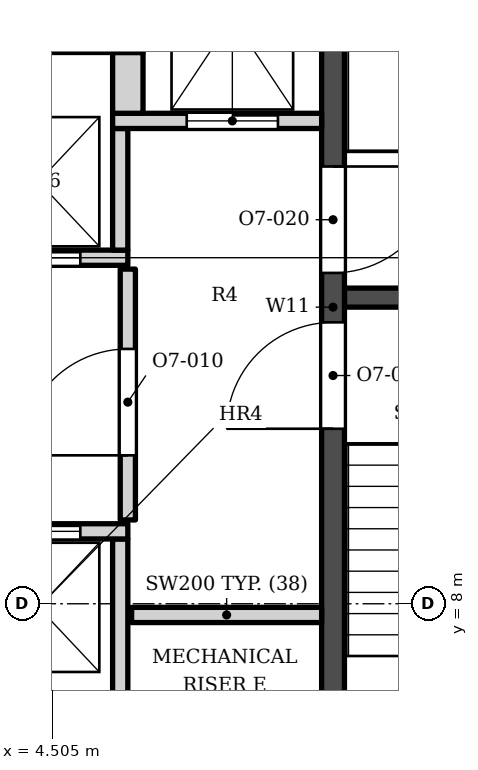
"""IFC4 building model, lengths in metres.
Left out: names, types, materials, properties, quantities, classifications, styles, units other than length and angle.
Written with IfcOpenShell. Run it as: python <this file> out.ifc"""

import sys

from ifc_helpers import new_model, si_unit, direction, frame, frame_2d, origin, place, context, subcontext, project, spatial, rectangle, extrude, element, fill, save


model = new_model("IFC4")
c1 = context("Model", 3, precision=1e-05, world=origin(), true_north=direction((0.0, 1.0)))
c2 = subcontext(c1, "Body", "Model", "MODEL_VIEW")
j1 = project(units=[si_unit("LENGTHUNIT", "METRE"), si_unit("PLANEANGLEUNIT", "RADIAN")], contexts=[c1])
p1 = place(None, origin())
s1 = spatial("IfcSite", under=j1, at=p1, CompositionType="ELEMENT")
p2 = place(p1, origin())
s2 = spatial("IfcBuilding", under=s1, at=p2, CompositionType="ELEMENT")
p3 = place(p2, frame((0.0, 0.0, 219.8)))
s3 = spatial("IfcBuildingStorey", under=s2, at=p3, CompositionType="ELEMENT", Elevation=219.8)
p4 = place(p3, frame((8.2, 5.253, 0.0), z_axis=(0.0, 0.0, 1.0), x_axis=(0.0, 1.0, 0.0)))
e1 = element("IfcWall", 1, at=p4, inside=s3, PredefinedType="SHEAR", context=c2, shape_type="SweptSolid", body=[
    extrude(rectangle(XDim=13.3, YDim=0.3, at=frame_2d((6.65, 0.0))), origin(), (0.0, 0.0, 1.0), 3.9),
])
p5 = place(p4, frame((7.1, 0.0, 0.0)))
e2 = element("IfcOpeningElement", 2, at=p5, cuts=e1, PredefinedType="OPENING", context=c2, shape_type="SweptSolid", body=[
    extrude(rectangle(XDim=1.4, YDim=2.1, at=frame_2d((0.7, 1.05))), frame((0.0, 0.16, 0.0), z_axis=(0.0, -1.0, 0.0), x_axis=(1.0, 0.0, 0.0)), (0.0, 0.0, 1.0), 0.32),
])
p6 = place(p4, frame((5.05, 0.0, 0.0)))
e3 = element("IfcOpeningElement", 3, at=p6, cuts=e1, PredefinedType="OPENING", context=c2, shape_type="SweptSolid", body=[
    extrude(rectangle(XDim=1.4, YDim=2.1, at=frame_2d((0.7, 1.05))), frame((0.0, 0.16, 0.0), z_axis=(0.0, -1.0, 0.0), x_axis=(1.0, 0.0, 0.0)), (0.0, 0.0, 1.0), 0.32),
])
p7 = place(p3, frame((8.35, 12.028, 0.0), z_axis=(0.0, 0.0, 1.0), x_axis=(1.0, 0.0, 0.0)))
e4 = element("IfcWall", 4, at=p7, inside=s3, PredefinedType="SHEAR", context=c2, shape_type="SweptSolid", body=[
    extrude(rectangle(XDim=3.75, YDim=0.25, at=frame_2d((1.875, 0.0))), origin(), (0.0, 0.0, 1.0), 3.9),
])
for number, where, z_axis, x_axis in (
    (5, (5.4, 6.353, 0.0), (0.0, 0.0, 1.0), (0.0, 1.0, 0.0)),
    (6, (5.55, 7.853, 0.0), (0.0, 0.0, 1.0), (1.0, 0.0, 0.0)),
):
    element("IfcWall", number, at=place(p3, frame(where, z_axis=z_axis, x_axis=x_axis)), inside=s3, PredefinedType="SOLIDWALL", context=c2, shape_type="SweptSolid", body=[
        extrude(rectangle(XDim=2.5, YDim=0.2, at=frame_2d((1.25, 0.0))), origin(), (0.0, 0.0, 1.0), 3.73),
    ])
p8 = place(p3, frame((1.0, 8.953, 0.0), z_axis=(0.0, 0.0, 1.0), x_axis=(1.0, 0.0, 0.0)))
e7 = element("IfcWall", 7, at=p8, inside=s3, PredefinedType="SOLIDWALL", context=c2, shape_type="SweptSolid", body=[
    extrude(rectangle(XDim=4.5, YDim=0.2, at=frame_2d((2.25, 0.0))), origin(), (0.0, 0.0, 1.0), 3.73),
])
p9 = place(p8, frame((0.625, 0.0, 0.0)))
e8 = element("IfcOpeningElement", 8, at=p9, cuts=e7, PredefinedType="OPENING", context=c2, shape_type="SweptSolid", body=[
    extrude(rectangle(XDim=1.1, YDim=2.1, at=frame_2d((0.55, 1.05))), frame((0.0, 0.11, 0.0), z_axis=(0.0, -1.0, 0.0), x_axis=(1.0, 0.0, 0.0)), (0.0, 0.0, 1.0), 0.22),
])
p10 = place(p8, frame((2.775, 0.0, 0.0)))
e9 = element("IfcOpeningElement", 9, at=p10, cuts=e7, PredefinedType="OPENING", context=c2, shape_type="SweptSolid", body=[
    extrude(rectangle(XDim=1.1, YDim=2.1, at=frame_2d((0.55, 1.05))), frame((0.0, 0.11, 0.0), z_axis=(0.0, -1.0, 0.0), x_axis=(1.0, 0.0, 0.0)), (0.0, 0.0, 1.0), 0.22),
])
p11 = place(p3, frame((5.5, 9.103, 0.0), z_axis=(0.0, 0.0, 1.0), x_axis=(0.0, 1.0, 0.0)))
e10 = element("IfcWall", 10, at=p11, inside=s3, PredefinedType="SOLIDWALL", context=c2, shape_type="SweptSolid", body=[
    extrude(rectangle(XDim=3.3, YDim=0.2, at=frame_2d((1.65, 0.0))), origin(), (0.0, 0.0, 1.0), 3.73),
])
p12 = place(p11, frame((0.85, 0.0, 0.0)))
e11 = element("IfcOpeningElement", 11, at=p12, cuts=e10, PredefinedType="OPENING", context=c2, shape_type="SweptSolid", body=[
    extrude(rectangle(XDim=1.4, YDim=2.1, at=frame_2d((0.7, 1.05))), frame((0.0, 0.11, 0.0), z_axis=(0.0, -1.0, 0.0), x_axis=(1.0, 0.0, 0.0)), (0.0, 0.0, 1.0), 0.22),
])
p13 = place(p3, frame((-1.5, 12.552, 0.0), z_axis=(0.0, 0.0, 1.0), x_axis=(1.0, 0.0, 0.0)))
e12 = element("IfcWall", 12, at=p13, inside=s3, PredefinedType="SOLIDWALL", context=c2, shape_type="SweptSolid", body=[
    extrude(rectangle(XDim=7.0, YDim=0.2, at=frame_2d((3.5, 0.0))), origin(), (0.0, 0.0, 1.0), 3.73),
])
p14 = place(p13, frame((3.075, 0.0, 0.0)))
e13 = element("IfcOpeningElement", 13, at=p14, cuts=e12, PredefinedType="OPENING", context=c2, shape_type="SweptSolid", body=[
    extrude(rectangle(XDim=1.1, YDim=2.1, at=frame_2d((0.55, 1.05))), frame((0.0, 0.11, 0.0), z_axis=(0.0, -1.0, 0.0), x_axis=(1.0, 0.0, 0.0)), (0.0, 0.0, 1.0), 0.22),
])
p15 = place(p13, frame((5.275, 0.0, 0.0)))
e14 = element("IfcOpeningElement", 14, at=p15, cuts=e12, PredefinedType="OPENING", context=c2, shape_type="SweptSolid", body=[
    extrude(rectangle(XDim=1.1, YDim=2.1, at=frame_2d((0.55, 1.05))), frame((0.0, 0.11, 0.0), z_axis=(0.0, -1.0, 0.0), x_axis=(1.0, 0.0, 0.0)), (0.0, 0.0, 1.0), 0.22),
])
p16 = place(p3, frame((5.4, 12.653, 0.0), z_axis=(0.0, 0.0, 1.0), x_axis=(0.0, 1.0, 0.0)))
e15 = element("IfcWall", 15, at=p16, inside=s3, PredefinedType="SOLIDWALL", context=c2, shape_type="SweptSolid", body=[
    extrude(rectangle(XDim=1.6, YDim=0.2, at=frame_2d((0.8, 0.0))), origin(), (0.0, 0.0, 1.0), 3.73),
])
p17 = place(p3, frame((5.3, 14.353, 0.0), z_axis=(0.0, 0.0, 1.0), x_axis=(1.0, 0.0, 0.0)))
e16 = element("IfcWall", 16, at=p17, inside=s3, PredefinedType="SOLIDWALL", context=c2, shape_type="SweptSolid", body=[
    extrude(rectangle(XDim=2.75, YDim=0.2, at=frame_2d((1.375, 0.0))), origin(), (0.0, 0.0, 1.0), 3.73),
])
p18 = place(p17, frame((0.975, 0.0, 0.0)))
e17 = element("IfcOpeningElement", 17, at=p18, cuts=e16, PredefinedType="OPENING", context=c2, shape_type="SweptSolid", body=[
    extrude(rectangle(XDim=1.2, YDim=2.1, at=frame_2d((0.6, 1.05))), frame((0.0, 0.11, 0.0), z_axis=(0.0, -1.0, 0.0), x_axis=(1.0, 0.0, 0.0)), (0.0, 0.0, 1.0), 0.22),
])
p19 = place(p3, frame((5.5, 14.453, 0.0), z_axis=(0.0, 0.0, 1.0), x_axis=(0.0, 1.0, 0.0)))
e18 = element("IfcWall", 18, at=p19, inside=s3, PredefinedType="SOLIDWALL", context=c2, shape_type="SweptSolid", body=[
    extrude(rectangle(XDim=0.8, YDim=0.4, at=frame_2d((0.4, 0.0))), origin(), (0.0, 0.0, 1.0), 3.73),
])
p20 = place(p3, frame((-1.5, 15.353, 0.0), z_axis=(0.0, 0.0, 1.0), x_axis=(1.0, 0.0, 0.0)))
e19 = element("IfcWall", 19, at=p20, inside=s3, PredefinedType="SOLIDWALL", context=c2, shape_type="SweptSolid", body=[
    extrude(rectangle(XDim=7.2, YDim=0.2, at=frame_2d((3.6, 0.0))), origin(), (0.0, 0.0, 1.0), 3.73),
])
p21 = place(p10, origin())
e20 = element("IfcDoor", 20, at=p21, inside=s3, OperationType="DOUBLE_DOOR_SLIDING", PredefinedType="DOOR", context=c2, shape_type="SweptSolid", body=[
    extrude(rectangle(XDim=1.1, YDim=2.1, at=frame_2d((0.55, 1.05))), frame((0.0, 0.025, 0.0), z_axis=(0.0, -1.0, 0.0), x_axis=(1.0, 0.0, 0.0)), (0.0, 0.0, 1.0), 0.05),
])
fill(e9, e20)
p22 = place(p15, origin())
e21 = element("IfcDoor", 21, at=p22, inside=s3, OperationType="DOUBLE_DOOR_SLIDING", PredefinedType="DOOR", context=c2, shape_type="SweptSolid", body=[
    extrude(rectangle(XDim=1.1, YDim=2.1, at=frame_2d((0.55, 1.05))), frame((0.0, 0.025, 0.0), z_axis=(0.0, -1.0, 0.0), x_axis=(1.0, 0.0, 0.0)), (0.0, 0.0, 1.0), 0.05),
])
fill(e14, e21)
p23 = place(p18, origin())
e22 = element("IfcDoor", 22, at=p23, inside=s3, OperationType="DOUBLE_DOOR_SLIDING", PredefinedType="DOOR", context=c2, shape_type="SweptSolid", body=[
    extrude(rectangle(XDim=1.2, YDim=2.1, at=frame_2d((0.6, 1.05))), frame((0.0, 0.025, 0.0), z_axis=(0.0, -1.0, 0.0), x_axis=(1.0, 0.0, 0.0)), (0.0, 0.0, 1.0), 0.05),
])
fill(e17, e22)
p24 = place(p5, origin())
e23 = element("IfcDoor", 23, at=p24, inside=s3, OperationType="SINGLE_SWING_RIGHT", PredefinedType="DOOR", context=c2, shape_type="SweptSolid", body=[
    extrude(rectangle(XDim=1.4, YDim=2.1, at=frame_2d((0.7, 1.05))), frame((0.0, 0.025, 0.0), z_axis=(0.0, -1.0, 0.0), x_axis=(1.0, 0.0, 0.0)), (0.0, 0.0, 1.0), 0.05),
])
fill(e2, e23)
p25 = place(p6, origin())
e24 = element("IfcDoor", 24, at=p25, inside=s3, OperationType="SINGLE_SWING_LEFT", PredefinedType="DOOR", context=c2, shape_type="SweptSolid", body=[
    extrude(rectangle(XDim=1.4, YDim=2.1, at=frame_2d((0.7, 1.05))), frame((0.0, 0.025, 0.0), z_axis=(0.0, -1.0, 0.0), x_axis=(1.0, 0.0, 0.0)), (0.0, 0.0, 1.0), 0.05),
])
fill(e3, e24)
p26 = place(p12, origin())
e25 = element("IfcDoor", 25, at=p26, inside=s3, OperationType="SINGLE_SWING_LEFT", PredefinedType="DOOR", context=c2, shape_type="SweptSolid", body=[
    extrude(rectangle(XDim=1.4, YDim=2.1, at=frame_2d((0.7, 1.05))), frame((0.0, 0.025, 0.0), z_axis=(0.0, -1.0, 0.0), x_axis=(1.0, 0.0, 0.0)), (0.0, 0.0, 1.0), 0.05),
])
fill(e11, e25)
save(model, sys.argv[1])
